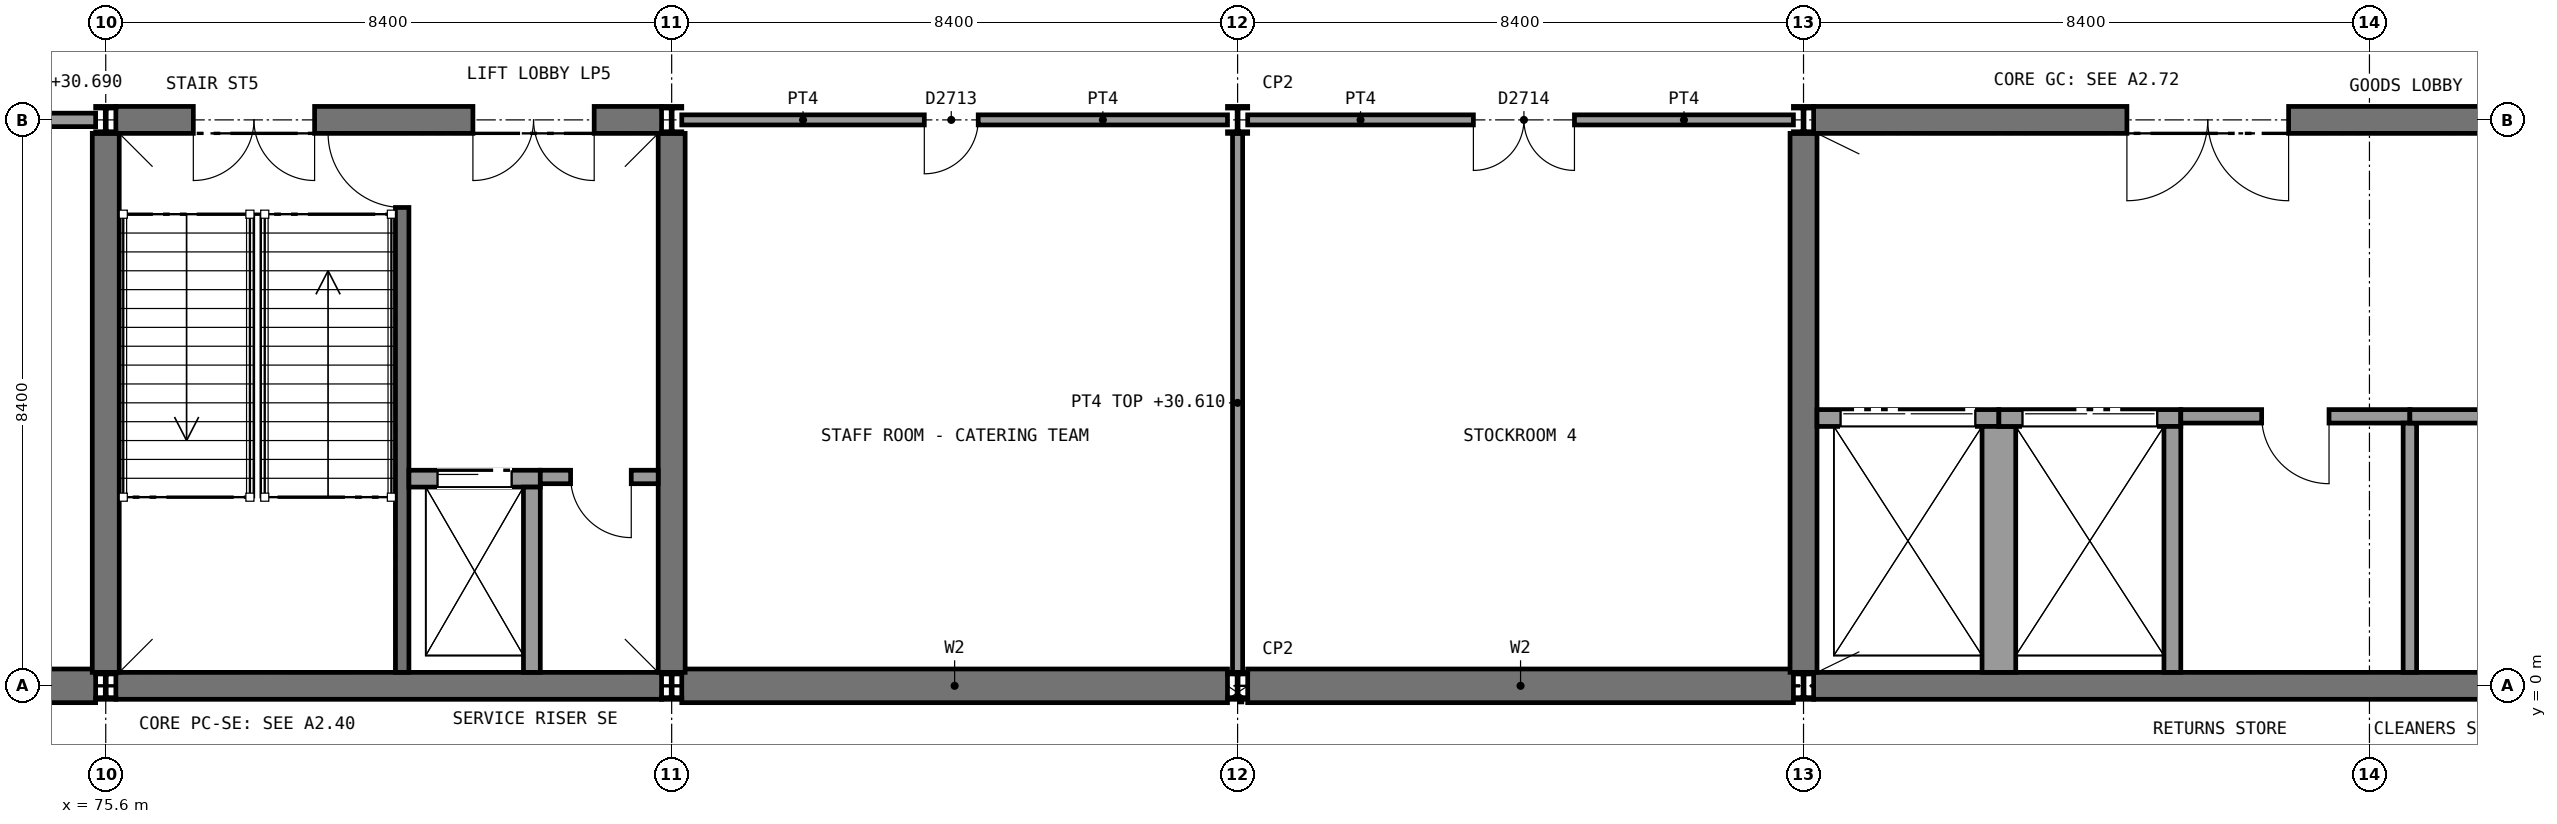
"""IFC4 building model, lengths in metres.
Left out: names, types, materials, properties, quantities, classifications, styles, units other than length and angle.
Written with IfcOpenShell. Run it as: python <this file> out.ifc"""

import sys

from ifc_helpers import new_model, si_unit, direction, frame, frame_2d, origin, origin_2d, place, context, subcontext, project, spatial, rectangle, i_section, extrude, element, fill, save


model = new_model("IFC4")
c1 = context("Model", 3, precision=1e-05, world=origin(), true_north=direction((0.0, 1.0)))
c2 = subcontext(c1, "Body", "Model", "MODEL_VIEW")
j1 = project(units=[si_unit("LENGTHUNIT", "METRE"), si_unit("PLANEANGLEUNIT", "RADIAN")], contexts=[c1])
p1 = place(None, origin())
s1 = spatial("IfcSite", under=j1, at=p1, CompositionType="ELEMENT")
p2 = place(p1, origin())
s2 = spatial("IfcBuilding", under=s1, at=p2, CompositionType="ELEMENT")
p3 = place(p2, frame((0.0, 0.0, 25.8)))
s3 = spatial("IfcBuildingStorey", under=s2, at=p3, CompositionType="ELEMENT", Elevation=25.8)
p4 = place(p3, frame((67.35, 0.0, 0.0), z_axis=(0.0, 0.0, 1.0), x_axis=(1.0, 0.0, 0.0)))
e1 = element("IfcWall", 1, at=p4, inside=s3, PredefinedType="SHEAR", context=c2, shape_type="SweptSolid", body=[
    extrude(rectangle(XDim=8.1, YDim=0.5, at=frame_2d((4.05, 0.0))), origin(), (0.0, 0.0, 1.0), 5.2),
])
p5 = place(p3, frame((84.15, 0.0, 0.0), z_axis=(0.0, 0.0, 1.0), x_axis=(1.0, 0.0, 0.0)))
e2 = element("IfcWall", 2, at=p5, inside=s3, PredefinedType="SHEAR", context=c2, shape_type="SweptSolid", body=[
    extrude(rectangle(XDim=8.1, YDim=0.5, at=frame_2d((4.05, 0.0))), origin(), (0.0, 0.0, 1.0), 5.2),
])
p6 = place(p3, frame((92.55, 0.0, 0.0), z_axis=(0.0, 0.0, 1.0), x_axis=(1.0, 0.0, 0.0)))
e3 = element("IfcWall", 3, at=p6, inside=s3, PredefinedType="SHEAR", context=c2, shape_type="SweptSolid", body=[
    extrude(rectangle(XDim=8.1, YDim=0.5, at=frame_2d((4.05, 0.0))), origin(), (0.0, 0.0, 1.0), 5.2),
])
p7 = place(p3, frame((75.75, 0.0, 0.0), z_axis=(0.0, 0.0, 1.0), x_axis=(1.0, 0.0, 0.0)))
e4 = element("IfcWall", 4, at=p7, inside=s3, PredefinedType="SHEAR", context=c2, shape_type="SweptSolid", body=[
    extrude(rectangle(XDim=8.1, YDim=0.4, at=frame_2d((4.05, 0.0))), origin(), (0.0, 0.0, 1.0), 4.51),
])
p8 = place(p3, frame((75.75, 8.4, 0.0), z_axis=(0.0, 0.0, 1.0), x_axis=(1.0, 0.0, 0.0)))
e5 = element("IfcWall", 5, at=p8, inside=s3, PredefinedType="SHEAR", context=c2, shape_type="SweptSolid", body=[
    extrude(rectangle(XDim=8.1, YDim=0.4, at=frame_2d((4.05, 0.0))), origin(), (0.0, 0.0, 1.0), 4.51),
])
p9 = place(p8, frame((1.15, 0.0, 0.0)))
e6 = element("IfcOpeningElement", 6, at=p9, cuts=e5, PredefinedType="OPENING", context=c2, shape_type="SweptSolid", body=[
    extrude(rectangle(XDim=1.8, YDim=2.1, at=frame_2d((0.9, 1.05))), frame((0.0, 0.21, 0.0), z_axis=(0.0, -1.0, 0.0), x_axis=(1.0, 0.0, 0.0)), (0.0, 0.0, 1.0), 0.42),
])
p10 = place(p8, frame((5.3, 0.0, 0.0)))
e7 = element("IfcOpeningElement", 7, at=p10, cuts=e5, PredefinedType="OPENING", context=c2, shape_type="SweptSolid", body=[
    extrude(rectangle(XDim=1.8, YDim=2.1, at=frame_2d((0.9, 1.05))), frame((0.0, 0.21, 0.0), z_axis=(0.0, -1.0, 0.0), x_axis=(1.0, 0.0, 0.0)), (0.0, 0.0, 1.0), 0.42),
])
for number, where, z_axis, x_axis in (
    (8, (75.6, 0.2, 0.0), (0.0, 0.0, 1.0), (0.0, 1.0, 0.0)),
    (9, (84.0, 0.2, 0.0), (0.0, 0.0, 1.0), (0.0, 1.0, 0.0)),
):
    element("IfcWall", number, at=place(p3, frame(where, z_axis=z_axis, x_axis=x_axis)), inside=s3, PredefinedType="SHEAR", context=c2, shape_type="SweptSolid", body=[
        extrude(rectangle(XDim=8.0, YDim=0.4, at=frame_2d((4.0, 0.0))), origin(), (0.0, 0.0, 1.0), 5.2),
    ])
p11 = place(p3, frame((100.95, 0.0, 0.0), z_axis=(0.0, 0.0, 1.0), x_axis=(1.0, 0.0, 0.0)))
e10 = element("IfcWall", 10, at=p11, inside=s3, PredefinedType="SHEAR", context=c2, shape_type="SweptSolid", body=[
    extrude(rectangle(XDim=12.25, YDim=0.4, at=frame_2d((6.125, 0.0))), origin(), (0.0, 0.0, 1.0), 5.2),
])
p12 = place(p3, frame((100.95, 8.4, 0.0), z_axis=(0.0, 0.0, 1.0), x_axis=(1.0, 0.0, 0.0)))
e11 = element("IfcWall", 11, at=p12, inside=s3, PredefinedType="SHEAR", context=c2, shape_type="SweptSolid", body=[
    extrude(rectangle(XDim=12.25, YDim=0.4, at=frame_2d((6.125, 0.0))), origin(), (0.0, 0.0, 1.0), 5.2),
])
p13 = place(p12, frame((4.65, 0.0, 0.0)))
e12 = element("IfcOpeningElement", 12, at=p13, cuts=e11, PredefinedType="OPENING", context=c2, shape_type="SweptSolid", body=[
    extrude(rectangle(XDim=2.4, YDim=2.4, at=frame_2d((1.2, 1.2))), frame((0.0, 0.21, 0.0), z_axis=(0.0, -1.0, 0.0), x_axis=(1.0, 0.0, 0.0)), (0.0, 0.0, 1.0), 0.42),
])
p14 = place(p3, frame((100.8, 0.2, 0.0), z_axis=(0.0, 0.0, 1.0), x_axis=(0.0, 1.0, 0.0)))
e13 = element("IfcWall", 13, at=p14, inside=s3, PredefinedType="SHEAR", context=c2, shape_type="SweptSolid", body=[
    extrude(rectangle(XDim=8.0, YDim=0.4, at=frame_2d((4.0, 0.0))), origin(), (0.0, 0.0, 1.0), 5.2),
])
for number, where, z_axis, x_axis in (
    (14, (75.6, 0.0, 0.0), (0.0, 0.0, 1.0), (1.0, 0.0, 0.0)),
    (15, (75.6, 8.4, 0.0), (0.0, 0.0, 1.0), (1.0, 0.0, 0.0)),
    (16, (84.0, 0.0, 0.0), (0.0, 0.0, 1.0), (1.0, 0.0, 0.0)),
    (17, (84.0, 8.4, 0.0), (0.0, 0.0, 1.0), (1.0, 0.0, 0.0)),
    (18, (92.4, 0.0, 0.0), (0.0, 0.0, 1.0), (1.0, 0.0, 0.0)),
    (19, (92.4, 8.4, 0.0), (0.0, 0.0, 1.0), (1.0, 0.0, 0.0)),
    (20, (100.8, 0.0, 0.0), (0.0, 0.0, 1.0), (1.0, 0.0, 0.0)),
    (21, (100.8, 8.4, 0.0), (0.0, 0.0, 1.0), (1.0, 0.0, 0.0)),
):
    element("IfcColumn", number, at=place(p3, frame(where, z_axis=z_axis, x_axis=x_axis)), inside=s3, PredefinedType="COLUMN", context=c2, shape_type="SweptSolid", body=[
        extrude(i_section(OverallWidth=0.3, OverallDepth=0.4, WebThickness=0.013, FlangeThickness=0.024, FilletRadius=0.027, at=origin_2d()), origin(), (0.0, 0.0, 1.0), 5.4),
    ])
p15 = place(p3, frame((71.4, 8.4, 0.0), z_axis=(0.0, 0.0, 1.0), x_axis=(1.0, 0.0, 0.0)))
e22 = element("IfcWall", 22, at=p15, inside=s3, PredefinedType="SOLIDWALL", context=c2, shape_type="SweptSolid", body=[
    extrude(rectangle(XDim=4.05, YDim=0.2, at=frame_2d((2.025, 0.0))), origin(), (0.0, 0.0, 1.0), 4.89),
])
p16 = place(p15, frame((1.35, 0.0, 0.0)))
e23 = element("IfcOpeningElement", 23, at=p16, cuts=e22, PredefinedType="OPENING", context=c2, shape_type="SweptSolid", body=[
    extrude(rectangle(XDim=1.2, YDim=2.1, at=frame_2d((0.6, 1.05))), frame((0.0, 0.11, 0.0), z_axis=(0.0, -1.0, 0.0), x_axis=(1.0, 0.0, 0.0)), (0.0, 0.0, 1.0), 0.22),
])
p17 = place(p3, frame((92.4, 0.2, 0.0), z_axis=(0.0, 0.0, 1.0), x_axis=(0.0, 1.0, 0.0)))
e24 = element("IfcWall", 24, at=p17, inside=s3, PredefinedType="SOLIDWALL", context=c2, shape_type="SweptSolid", body=[
    extrude(rectangle(XDim=8.0, YDim=0.15, at=frame_2d((4.0, 0.0))), origin(), (0.0, 0.0, 1.0), 4.81),
])
p18 = place(p3, frame((84.15, 8.4, 0.0), z_axis=(0.0, 0.0, 1.0), x_axis=(1.0, 0.0, 0.0)))
e25 = element("IfcWall", 25, at=p18, inside=s3, PredefinedType="SOLIDWALL", context=c2, shape_type="SweptSolid", body=[
    extrude(rectangle(XDim=8.1, YDim=0.15, at=frame_2d((4.05, 0.0))), origin(), (0.0, 0.0, 1.0), 4.89),
])
p19 = place(p18, frame((3.6, 0.0, 0.0)))
e26 = element("IfcOpeningElement", 26, at=p19, cuts=e25, PredefinedType="OPENING", context=c2, shape_type="SweptSolid", body=[
    extrude(rectangle(XDim=0.8, YDim=2.1, at=frame_2d((0.4, 1.05))), frame((0.0, 0.085, 0.0), z_axis=(0.0, -1.0, 0.0), x_axis=(1.0, 0.0, 0.0)), (0.0, 0.0, 1.0), 0.17),
])
p20 = place(p3, frame((92.55, 8.4, 0.0), z_axis=(0.0, 0.0, 1.0), x_axis=(1.0, 0.0, 0.0)))
e27 = element("IfcWall", 27, at=p20, inside=s3, PredefinedType="SOLIDWALL", context=c2, shape_type="SweptSolid", body=[
    extrude(rectangle(XDim=8.1, YDim=0.15, at=frame_2d((4.05, 0.0))), origin(), (0.0, 0.0, 1.0), 4.89),
])
p21 = place(p20, frame((3.35, 0.0, 0.0)))
e28 = element("IfcOpeningElement", 28, at=p21, cuts=e27, PredefinedType="OPENING", context=c2, shape_type="SweptSolid", body=[
    extrude(rectangle(XDim=1.5, YDim=2.1, at=frame_2d((0.75, 1.05))), frame((0.0, 0.085, 0.0), z_axis=(0.0, -1.0, 0.0), x_axis=(1.0, 0.0, 0.0)), (0.0, 0.0, 1.0), 0.17),
])
p22 = place(p3, frame((80.0, 0.2, 0.0), z_axis=(0.0, 0.0, 1.0), x_axis=(0.0, 1.0, 0.0)))
e29 = element("IfcWall", 29, at=p22, inside=s3, PredefinedType="SHEAR", context=c2, shape_type="SweptSolid", body=[
    extrude(rectangle(XDim=8.0, YDim=0.2, at=frame_2d((4.0, 0.0))), origin(), (0.0, 0.0, 1.0), 5.2),
])
p23 = place(p22, frame((6.9, 0.0, 0.0)))
e30 = element("IfcOpeningElement", 30, at=p23, cuts=e29, PredefinedType="OPENING", context=c2, shape_type="SweptSolid", body=[
    extrude(rectangle(XDim=1.11, YDim=2.1, at=frame_2d((0.555, 1.05))), frame((0.0, 0.11, 0.0), z_axis=(0.0, -1.0, 0.0), x_axis=(1.0, 0.0, 0.0)), (0.0, 0.0, 1.0), 0.22),
])
p24 = place(p3, frame((80.1, 3.075, 0.0), z_axis=(0.0, 0.0, 1.0), x_axis=(1.0, 0.0, 0.0)))
e31 = element("IfcWall", 31, at=p24, inside=s3, PredefinedType="SOLIDWALL", context=c2, shape_type="SweptSolid", body=[
    extrude(rectangle(XDim=1.95, YDim=0.25, at=frame_2d((0.975, 0.0))), origin(), (0.0, 0.0, 1.0), 5.2),
])
p25 = place(p24, frame((0.425, 0.0, 0.0)))
e32 = element("IfcOpeningElement", 32, at=p25, cuts=e31, PredefinedType="OPENING", context=c2, shape_type="SweptSolid", body=[
    extrude(rectangle(XDim=1.1, YDim=2.1, at=frame_2d((0.55, 1.05))), frame((0.0, 0.135, 0.0), z_axis=(0.0, -1.0, 0.0), x_axis=(1.0, 0.0, 0.0)), (0.0, 0.0, 1.0), 0.27),
])
p26 = place(p3, frame((81.925, 0.2, 0.0), z_axis=(0.0, 0.0, 1.0), x_axis=(0.0, 1.0, 0.0)))
e33 = element("IfcWall", 33, at=p26, inside=s3, PredefinedType="SOLIDWALL", context=c2, shape_type="SweptSolid", body=[
    extrude(rectangle(XDim=2.75, YDim=0.25, at=frame_2d((1.375, 0.0))), origin(), (0.0, 0.0, 1.0), 5.2),
])
p27 = place(p3, frame((82.05, 3.1, 0.0), z_axis=(0.0, 0.0, 1.0), x_axis=(1.0, 0.0, 0.0)))
e34 = element("IfcWall", 34, at=p27, inside=s3, PredefinedType="PARTITIONING", context=c2, shape_type="SweptSolid", body=[
    extrude(rectangle(XDim=1.75, YDim=0.2, at=frame_2d((0.875, 0.0))), origin(), (0.0, 0.0, 1.0), 5.2),
])
p28 = place(p27, frame((0.45, 0.0, 0.0)))
e35 = element("IfcOpeningElement", 35, at=p28, cuts=e34, PredefinedType="OPENING", context=c2, shape_type="SweptSolid", body=[
    extrude(rectangle(XDim=0.9, YDim=2.1, at=frame_2d((0.45, 1.05))), frame((0.0, 0.11, 0.0), z_axis=(0.0, -1.0, 0.0), x_axis=(1.0, 0.0, 0.0)), (0.0, 0.0, 1.0), 0.22),
])
p29 = place(p3, frame((101.0, 3.975, 0.0), z_axis=(0.0, 0.0, 1.0), x_axis=(1.0, 0.0, 0.0)))
e36 = element("IfcWall", 36, at=p29, inside=s3, PredefinedType="SOLIDWALL", context=c2, shape_type="SweptSolid", body=[
    extrude(rectangle(XDim=2.7, YDim=0.25, at=frame_2d((1.35, 0.0))), origin(), (0.0, 0.0, 1.0), 5.2),
])
p30 = place(p29, frame((0.35, 0.0, 0.0)))
e37 = element("IfcOpeningElement", 37, at=p30, cuts=e36, PredefinedType="OPENING", context=c2, shape_type="SweptSolid", body=[
    extrude(rectangle(XDim=2.0, YDim=2.2, at=frame_2d((1.0, 1.1))), frame((0.0, 0.135, 0.0), z_axis=(0.0, -1.0, 0.0), x_axis=(1.0, 0.0, 0.0)), (0.0, 0.0, 1.0), 0.27),
])
p31 = place(p3, frame((103.7, 0.2, 0.0), z_axis=(0.0, 0.0, 1.0), x_axis=(0.0, 1.0, 0.0)))
e38 = element("IfcWall", 38, at=p31, inside=s3, PredefinedType="SOLIDWALL", context=c2, shape_type="SweptSolid", body=[
    extrude(rectangle(XDim=3.65, YDim=0.5, at=frame_2d((1.825, 0.0))), origin(), (0.0, 0.0, 1.0), 5.2),
])
p32 = place(p3, frame((103.7, 3.975, 0.0), z_axis=(0.0, 0.0, 1.0), x_axis=(1.0, 0.0, 0.0)))
e39 = element("IfcWall", 39, at=p32, inside=s3, PredefinedType="SOLIDWALL", context=c2, shape_type="SweptSolid", body=[
    extrude(rectangle(XDim=2.7, YDim=0.25, at=frame_2d((1.35, 0.0))), origin(), (0.0, 0.0, 1.0), 5.2),
])
p33 = place(p32, frame((0.35, 0.0, 0.0)))
e40 = element("IfcOpeningElement", 40, at=p33, cuts=e39, PredefinedType="OPENING", context=c2, shape_type="SweptSolid", body=[
    extrude(rectangle(XDim=2.0, YDim=2.2, at=frame_2d((1.0, 1.1))), frame((0.0, 0.135, 0.0), z_axis=(0.0, -1.0, 0.0), x_axis=(1.0, 0.0, 0.0)), (0.0, 0.0, 1.0), 0.27),
])
p34 = place(p3, frame((106.275, 0.2, 0.0), z_axis=(0.0, 0.0, 1.0), x_axis=(0.0, 1.0, 0.0)))
e41 = element("IfcWall", 41, at=p34, inside=s3, PredefinedType="SOLIDWALL", context=c2, shape_type="SweptSolid", body=[
    extrude(rectangle(XDim=3.65, YDim=0.25, at=frame_2d((1.825, 0.0))), origin(), (0.0, 0.0, 1.0), 5.2),
])
p35 = place(p3, frame((106.4, 4.0, 0.0), z_axis=(0.0, 0.0, 1.0), x_axis=(1.0, 0.0, 0.0)))
e42 = element("IfcWall", 42, at=p35, inside=s3, PredefinedType="PARTITIONING", context=c2, shape_type="SweptSolid", body=[
    extrude(rectangle(XDim=3.4, YDim=0.2, at=frame_2d((1.7, 0.0))), origin(), (0.0, 0.0, 1.0), 5.2),
])
p36 = place(p35, frame((1.2, 0.0, 0.0)))
e43 = element("IfcOpeningElement", 43, at=p36, cuts=e42, PredefinedType="OPENING", context=c2, shape_type="SweptSolid", body=[
    extrude(rectangle(XDim=1.0, YDim=2.1, at=frame_2d((0.5, 1.05))), frame((0.0, 0.11, 0.0), z_axis=(0.0, -1.0, 0.0), x_axis=(1.0, 0.0, 0.0)), (0.0, 0.0, 1.0), 0.22),
])
p37 = place(p3, frame((109.8, 0.2, 0.0), z_axis=(0.0, 0.0, 1.0), x_axis=(0.0, 1.0, 0.0)))
e44 = element("IfcWall", 44, at=p37, inside=s3, PredefinedType="PARTITIONING", context=c2, shape_type="SweptSolid", body=[
    extrude(rectangle(XDim=3.7, YDim=0.2, at=frame_2d((1.85, 0.0))), origin(), (0.0, 0.0, 1.0), 5.2),
])
p38 = place(p3, frame((109.8, 4.0, 0.0), z_axis=(0.0, 0.0, 1.0), x_axis=(1.0, 0.0, 0.0)))
e45 = element("IfcWall", 45, at=p38, inside=s3, PredefinedType="PARTITIONING", context=c2, shape_type="SweptSolid", body=[
    extrude(rectangle(XDim=3.3, YDim=0.2, at=frame_2d((1.65, 0.0))), origin(), (0.0, 0.0, 1.0), 5.2),
])
p39 = place(p38, frame((1.15, 0.0, 0.0)))
e46 = element("IfcOpeningElement", 46, at=p39, cuts=e45, PredefinedType="OPENING", context=c2, shape_type="SweptSolid", body=[
    extrude(rectangle(XDim=1.0, YDim=2.1, at=frame_2d((0.5, 1.05))), frame((0.0, 0.11, 0.0), z_axis=(0.0, -1.0, 0.0), x_axis=(1.0, 0.0, 0.0)), (0.0, 0.0, 1.0), 0.22),
])
p40 = place(p19, frame((0.8, 0.0, 0.0), z_axis=(0.0, 0.0, 1.0), x_axis=(-1.0, 0.0, 0.0)))
e47 = element("IfcDoor", 47, at=p40, inside=s3, OperationType="SINGLE_SWING_RIGHT", PredefinedType="DOOR", context=c2, shape_type="SweptSolid", body=[
    extrude(rectangle(XDim=0.8, YDim=2.1, at=frame_2d((0.4, 1.05))), frame((0.0, 0.025, 0.0), z_axis=(0.0, -1.0, 0.0), x_axis=(1.0, 0.0, 0.0)), (0.0, 0.0, 1.0), 0.05),
])
fill(e26, e47)
p41 = place(p21, frame((1.5, 0.0, 0.0), z_axis=(0.0, 0.0, 1.0), x_axis=(-1.0, 0.0, 0.0)))
e48 = element("IfcDoor", 48, at=p41, inside=s3, OperationType="DOUBLE_DOOR_SINGLE_SWING", PredefinedType="DOOR", context=c2, shape_type="SweptSolid", body=[
    extrude(rectangle(XDim=1.5, YDim=2.1, at=frame_2d((0.75, 1.05))), frame((0.0, 0.025, 0.0), z_axis=(0.0, -1.0, 0.0), x_axis=(1.0, 0.0, 0.0)), (0.0, 0.0, 1.0), 0.05),
])
fill(e28, e48)
p42 = place(p23, origin())
e49 = element("IfcDoor", 49, at=p42, inside=s3, OperationType="SINGLE_SWING_RIGHT", PredefinedType="DOOR", context=c2, shape_type="SweptSolid", body=[
    extrude(rectangle(XDim=1.1, YDim=2.1, at=frame_2d((0.55, 1.05))), frame((0.0, 0.025, 0.0), z_axis=(0.0, -1.0, 0.0), x_axis=(1.0, 0.0, 0.0)), (0.0, 0.0, 1.0), 0.05),
])
fill(e30, e49)
p43 = place(p25, origin())
e50 = element("IfcDoor", 50, at=p43, inside=s3, OperationType="SLIDING_TO_LEFT", PredefinedType="DOOR", context=c2, shape_type="SweptSolid", body=[
    extrude(rectangle(XDim=1.1, YDim=2.1, at=frame_2d((0.55, 1.05))), frame((0.0, 0.025, 0.0), z_axis=(0.0, -1.0, 0.0), x_axis=(1.0, 0.0, 0.0)), (0.0, 0.0, 1.0), 0.05),
])
fill(e32, e50)
p44 = place(p28, frame((0.9, 0.0, 0.0), z_axis=(0.0, 0.0, 1.0), x_axis=(-1.0, 0.0, 0.0)))
e51 = element("IfcDoor", 51, at=p44, inside=s3, OperationType="SINGLE_SWING_LEFT", PredefinedType="DOOR", context=c2, shape_type="SweptSolid", body=[
    extrude(rectangle(XDim=0.9, YDim=2.1, at=frame_2d((0.45, 1.05))), frame((0.0, 0.025, 0.0), z_axis=(0.0, -1.0, 0.0), x_axis=(1.0, 0.0, 0.0)), (0.0, 0.0, 1.0), 0.05),
])
fill(e35, e51)
p45 = place(p9, frame((1.8, 0.0, 0.0), z_axis=(0.0, 0.0, 1.0), x_axis=(-1.0, 0.0, 0.0)))
e52 = element("IfcDoor", 52, at=p45, inside=s3, OperationType="DOUBLE_DOOR_SINGLE_SWING", PredefinedType="DOOR", context=c2, shape_type="SweptSolid", body=[
    extrude(rectangle(XDim=1.8, YDim=2.1, at=frame_2d((0.9, 1.05))), frame((0.0, 0.025, 0.0), z_axis=(0.0, -1.0, 0.0), x_axis=(1.0, 0.0, 0.0)), (0.0, 0.0, 1.0), 0.05),
])
fill(e6, e52)
p46 = place(p10, frame((1.8, 0.0, 0.0), z_axis=(0.0, 0.0, 1.0), x_axis=(-1.0, 0.0, 0.0)))
e53 = element("IfcDoor", 53, at=p46, inside=s3, OperationType="DOUBLE_DOOR_SINGLE_SWING", PredefinedType="DOOR", context=c2, shape_type="SweptSolid", body=[
    extrude(rectangle(XDim=1.8, YDim=2.1, at=frame_2d((0.9, 1.05))), frame((0.0, 0.025, 0.0), z_axis=(0.0, -1.0, 0.0), x_axis=(1.0, 0.0, 0.0)), (0.0, 0.0, 1.0), 0.05),
])
fill(e7, e53)
p47 = place(p30, origin())
e54 = element("IfcDoor", 54, at=p47, inside=s3, OperationType="DOUBLE_DOOR_SLIDING", PredefinedType="DOOR", context=c2, shape_type="SweptSolid", body=[
    extrude(rectangle(XDim=2.0, YDim=2.2, at=frame_2d((1.0, 1.1))), frame((0.0, 0.025, 0.0), z_axis=(0.0, -1.0, 0.0), x_axis=(1.0, 0.0, 0.0)), (0.0, 0.0, 1.0), 0.05),
])
fill(e37, e54)
p48 = place(p33, origin())
e55 = element("IfcDoor", 55, at=p48, inside=s3, OperationType="DOUBLE_DOOR_SLIDING", PredefinedType="DOOR", context=c2, shape_type="SweptSolid", body=[
    extrude(rectangle(XDim=2.0, YDim=2.2, at=frame_2d((1.0, 1.1))), frame((0.0, 0.025, 0.0), z_axis=(0.0, -1.0, 0.0), x_axis=(1.0, 0.0, 0.0)), (0.0, 0.0, 1.0), 0.05),
])
fill(e40, e55)
p49 = place(p36, frame((1.0, 0.0, 0.0), z_axis=(0.0, 0.0, 1.0), x_axis=(-1.0, 0.0, 0.0)))
e56 = element("IfcDoor", 56, at=p49, inside=s3, OperationType="SINGLE_SWING_LEFT", PredefinedType="DOOR", context=c2, shape_type="SweptSolid", body=[
    extrude(rectangle(XDim=1.0, YDim=2.1, at=frame_2d((0.5, 1.05))), frame((0.0, 0.025, 0.0), z_axis=(0.0, -1.0, 0.0), x_axis=(1.0, 0.0, 0.0)), (0.0, 0.0, 1.0), 0.05),
])
fill(e43, e56)
p50 = place(p13, frame((2.4, 0.0, 0.0), z_axis=(0.0, 0.0, 1.0), x_axis=(-1.0, 0.0, 0.0)))
e57 = element("IfcDoor", 57, at=p50, inside=s3, OperationType="DOUBLE_DOOR_SINGLE_SWING", PredefinedType="DOOR", context=c2, shape_type="SweptSolid", body=[
    extrude(rectangle(XDim=2.4, YDim=2.4, at=frame_2d((1.2, 1.2))), frame((0.0, 0.025, 0.0), z_axis=(0.0, -1.0, 0.0), x_axis=(1.0, 0.0, 0.0)), (0.0, 0.0, 1.0), 0.05),
])
fill(e12, e57)
save(model, sys.argv[1])
